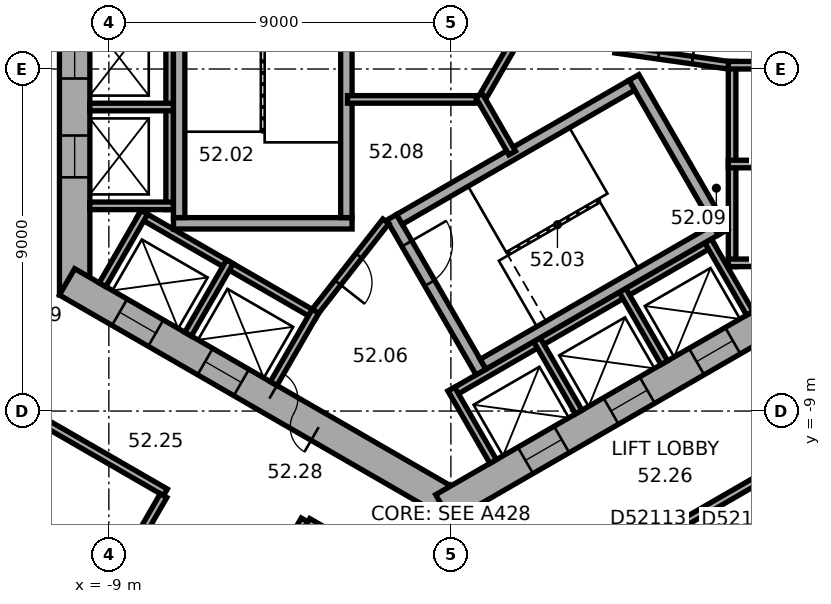
"""IFC4 building model, lengths in metres.
Left out: names, types, materials, properties, quantities, classifications, styles, units other than length and angle.
Written with IfcOpenShell. Run it as: python <this file> out.ifc"""

import sys

from ifc_helpers import new_model, si_unit, direction, frame, frame_2d, origin, place, context, subcontext, project, spatial, rectangle, extrude, element, fill, save


model = new_model("IFC4")
c1 = context("Model", 3, precision=1e-05, world=origin(), true_north=direction((0.0, 1.0)))
c2 = subcontext(c1, "Body", "Model", "MODEL_VIEW")
j1 = project(units=[si_unit("LENGTHUNIT", "METRE"), si_unit("PLANEANGLEUNIT", "RADIAN")], contexts=[c1])
p1 = place(None, origin())
s1 = spatial("IfcSite", under=j1, at=p1, CompositionType="ELEMENT")
p2 = place(p1, origin())
s2 = spatial("IfcBuilding", under=s1, at=p2, CompositionType="ELEMENT")
p3 = place(p2, frame((0.0, 0.0, 210.6)))
s3 = spatial("IfcBuildingStorey", under=s2, at=p3, CompositionType="ELEMENT", Elevation=210.6)
p4 = place(p3, frame((-9.9, 5.947, 0.0), z_axis=(0.0, 0.0, 1.0), x_axis=(0.0, -1.0, 0.0)))
e1 = element("IfcWall", 1, at=p4, inside=s3, PredefinedType="SHEAR", context=c2, shape_type="SweptSolid", body=[
    extrude(rectangle(XDim=11.894, YDim=0.8, at=frame_2d((5.947, 0.0))), origin(), (0.0, 0.0, 1.0), 3.7),
])
p5 = place(p4, frame((5.097, 0.0, 0.0)))
e2 = element("IfcOpeningElement", 2, at=p5, cuts=e1, PredefinedType="OPENING", context=c2, shape_type="SweptSolid", body=[
    extrude(rectangle(XDim=1.1, YDim=2.1, at=frame_2d((0.55, 1.05))), frame((0.0, 0.41, 0.0), z_axis=(0.0, -1.0, 0.0), x_axis=(1.0, 0.0, 0.0)), (0.0, 0.0, 1.0), 0.82),
])
p6 = place(p4, frame((7.697, 0.0, 0.0)))
e3 = element("IfcOpeningElement", 3, at=p6, cuts=e1, PredefinedType="OPENING", context=c2, shape_type="SweptSolid", body=[
    extrude(rectangle(XDim=1.1, YDim=2.1, at=frame_2d((0.55, 1.05))), frame((0.0, 0.41, 0.0), z_axis=(0.0, -1.0, 0.0), x_axis=(1.0, 0.0, 0.0)), (0.0, 0.0, 1.0), 0.82),
])
p7 = place(p3, frame((-10.1, -5.6, 0.0), z_axis=(0.0, 0.0, 1.0), x_axis=(0.866023897231, -0.500002609418, 0.0)))
e4 = element("IfcWall", 4, at=p7, inside=s3, PredefinedType="SHEAR", context=c2, shape_type="SweptSolid", body=[
    extrude(rectangle(XDim=11.894, YDim=0.8, at=frame_2d((5.947, 0.0))), origin(), (0.0, 0.0, 1.0), 3.7),
])
p8 = place(p7, frame((6.147, 0.0, 0.0)))
e5 = element("IfcOpeningElement", 5, at=p8, cuts=e4, PredefinedType="OPENING", context=c2, shape_type="SweptSolid", body=[
    extrude(rectangle(XDim=1.5, YDim=2.1, at=frame_2d((0.75, 1.05))), frame((0.0, 0.41, 0.0), z_axis=(0.0, -1.0, 0.0), x_axis=(1.0, 0.0, 0.0)), (0.0, 0.0, 1.0), 0.82),
])
p9 = place(p7, frame((1.597, 0.0, 0.0)))
e6 = element("IfcOpeningElement", 6, at=p9, cuts=e4, PredefinedType="OPENING", context=c2, shape_type="SweptSolid", body=[
    extrude(rectangle(XDim=1.1, YDim=2.1, at=frame_2d((0.55, 1.05))), frame((0.0, 0.41, 0.0), z_axis=(0.0, -1.0, 0.0), x_axis=(1.0, 0.0, 0.0)), (0.0, 0.0, 1.0), 0.82),
])
p10 = place(p7, frame((4.197, 0.0, 0.0)))
e7 = element("IfcOpeningElement", 7, at=p10, cuts=e4, PredefinedType="OPENING", context=c2, shape_type="SweptSolid", body=[
    extrude(rectangle(XDim=1.1, YDim=2.1, at=frame_2d((0.55, 1.05))), frame((0.0, 0.41, 0.0), z_axis=(0.0, -1.0, 0.0), x_axis=(1.0, 0.0, 0.0)), (0.0, 0.0, 1.0), 0.82),
])
p11 = place(p3, frame((-0.2, -11.547, 0.0), z_axis=(0.0, 0.0, 1.0), x_axis=(0.866023897231, 0.500002609418, 0.0)))
e8 = element("IfcWall", 8, at=p11, inside=s3, PredefinedType="SHEAR", context=c2, shape_type="SweptSolid", body=[
    extrude(rectangle(XDim=11.894, YDim=0.8, at=frame_2d((5.947, 0.0))), origin(), (0.0, 0.0, 1.0), 3.7),
])
p12 = place(p11, frame((2.497, 0.0, 0.0)))
e9 = element("IfcOpeningElement", 9, at=p12, cuts=e8, PredefinedType="OPENING", context=c2, shape_type="SweptSolid", body=[
    extrude(rectangle(XDim=1.1, YDim=2.1, at=frame_2d((0.55, 1.05))), frame((0.0, 0.41, 0.0), z_axis=(0.0, -1.0, 0.0), x_axis=(1.0, 0.0, 0.0)), (0.0, 0.0, 1.0), 0.82),
])
p13 = place(p11, frame((5.097, 0.0, 0.0)))
e10 = element("IfcOpeningElement", 10, at=p13, cuts=e8, PredefinedType="OPENING", context=c2, shape_type="SweptSolid", body=[
    extrude(rectangle(XDim=1.1, YDim=2.1, at=frame_2d((0.55, 1.05))), frame((0.0, 0.41, 0.0), z_axis=(0.0, -1.0, 0.0), x_axis=(1.0, 0.0, 0.0)), (0.0, 0.0, 1.0), 0.82),
])
p14 = place(p11, frame((7.697, 0.0, 0.0)))
e11 = element("IfcOpeningElement", 11, at=p14, cuts=e8, PredefinedType="OPENING", context=c2, shape_type="SweptSolid", body=[
    extrude(rectangle(XDim=1.1, YDim=2.1, at=frame_2d((0.55, 1.05))), frame((0.0, 0.41, 0.0), z_axis=(0.0, -1.0, 0.0), x_axis=(1.0, 0.0, 0.0)), (0.0, 0.0, 1.0), 0.82),
])
p15 = place(p3, frame((7.4, -5.2, 0.0), z_axis=(0.0, 0.0, 1.0), x_axis=(0.0, 1.0, 0.0)))
e12 = element("IfcWall", 12, at=p15, inside=s3, PredefinedType="PARTITIONING", context=c2, shape_type="SweptSolid", body=[
    extrude(rectangle(XDim=5.4, YDim=0.2, at=frame_2d((2.7, 0.0))), origin(), (0.0, 0.0, 1.0), 3.35),
])
for number, where, z_axis, x_axis in (
    (13, (7.3, -5.1, 0.0), (0.0, 0.0, 1.0), (1.0, 0.0, 0.0)),
    (14, (7.3, -2.5, 0.0), (0.0, 0.0, 1.0), (1.0, 0.0, 0.0)),
    (15, (7.3, 0.1, 0.0), (0.0, 0.0, 1.0), (1.0, 0.0, 0.0)),
):
    element("IfcWall", number, at=place(p3, frame(where, z_axis=z_axis, x_axis=x_axis)), inside=s3, PredefinedType="PARTITIONING", context=c2, shape_type="SweptSolid", body=[
        extrude(rectangle(XDim=2.2, YDim=0.2, at=frame_2d((1.1, 0.0))), origin(), (0.0, 0.0, 1.0), 3.35),
    ])
p16 = place(p3, frame((-7.4, 4.3, 0.0), z_axis=(0.0, 0.0, 1.0), x_axis=(0.0, -1.0, 0.0)))
e16 = element("IfcWall", 16, at=p16, inside=s3, PredefinedType="PARTITIONING", context=c2, shape_type="SweptSolid", body=[
    extrude(rectangle(XDim=8.0, YDim=0.2, at=frame_2d((4.0, 0.0))), origin(), (0.0, 0.0, 1.0), 3.35),
])
for number, where, z_axis, x_axis in (
    (17, (-7.3, -1.0, 0.0), (0.0, 0.0, 1.0), (-1.0, 0.0, 0.0)),
    (18, (-7.3, -3.6, 0.0), (0.0, 0.0, 1.0), (-1.0, 0.0, 0.0)),
):
    element("IfcWall", number, at=place(p3, frame(where, z_axis=z_axis, x_axis=x_axis)), inside=s3, PredefinedType="PARTITIONING", context=c2, shape_type="SweptSolid", body=[
        extrude(rectangle(XDim=2.2, YDim=0.2, at=frame_2d((1.1, 0.0))), origin(), (0.0, 0.0, 1.0), 3.35),
    ])
p17 = place(p3, frame((-8.203, -3.809, 0.0), z_axis=(0.0, 0.0, 1.0), x_axis=(0.866028230842, -0.499995103361, 0.0)))
e19 = element("IfcWall", 19, at=p17, inside=s3, PredefinedType="PARTITIONING", context=c2, shape_type="SweptSolid", body=[
    extrude(rectangle(XDim=5.4, YDim=0.2, at=frame_2d((2.7, 0.0))), origin(), (0.0, 0.0, 1.0), 3.35),
])
for number, where, z_axis, x_axis in (
    (20, (-8.067, -3.772, 0.0), (0.0, 0.0, 1.0), (-0.5, -0.866, 0.0)),
    (21, (-5.815, -5.072, 0.0), (0.0, 0.0, 1.0), (-0.5, -0.866, 0.0)),
):
    element("IfcWall", number, at=place(p3, frame(where, z_axis=z_axis, x_axis=x_axis)), inside=s3, PredefinedType="PARTITIONING", context=c2, shape_type="SweptSolid", body=[
        extrude(rectangle(XDim=2.2, YDim=0.2, at=frame_2d((1.1, 0.0))), origin(), (0.0, 0.0, 1.0), 3.35),
    ])
p18 = place(p3, frame((-3.563, -6.372, 0.0), z_axis=(0.0, 0.0, 1.0), x_axis=(-0.499994660107, -0.866028486751, 0.0)))
e22 = element("IfcWall", 22, at=p18, inside=s3, PredefinedType="PARTITIONING", context=c2, shape_type="SweptSolid", body=[
    extrude(rectangle(XDim=2.2, YDim=0.2, at=frame_2d((1.1, 0.0))), origin(), (0.0, 0.0, 1.0), 3.35),
])
p19 = place(p3, frame((-0.024, -8.559, 0.0), z_axis=(0.0, 0.0, 1.0), x_axis=(0.866026010844, 0.49999894854, 0.0)))
e23 = element("IfcWall", 23, at=p19, inside=s3, PredefinedType="PARTITIONING", context=c2, shape_type="SweptSolid", body=[
    extrude(rectangle(XDim=8.0, YDim=0.2, at=frame_2d((4.0, 0.0))), origin(), (0.0, 0.0, 1.0), 3.35),
])
for number, where, z_axis, x_axis in (
    (24, (0.013, -8.422, 0.0), (0.0, 0.0, 1.0), (0.5, -0.866, 0.0)),
    (25, (2.264, -7.122, 0.0), (0.0, 0.0, 1.0), (0.5, -0.866, 0.0)),
    (26, (4.516, -5.822, 0.0), (0.0, 0.0, 1.0), (0.5, -0.866, 0.0)),
    (27, (6.768, -4.522, 0.0), (0.0, 0.0, 1.0), (0.5, -0.866, 0.0)),
):
    element("IfcWall", number, at=place(p3, frame(where, z_axis=z_axis, x_axis=x_axis)), inside=s3, PredefinedType="PARTITIONING", context=c2, shape_type="SweptSolid", body=[
        extrude(rectangle(XDim=2.2, YDim=0.2, at=frame_2d((1.1, 0.0))), origin(), (0.0, 0.0, 1.0), 3.35),
    ])
p20 = place(p3, frame((-2.6, -4.06, 0.0), z_axis=(0.0, 0.0, 1.0), x_axis=(-1.0, 0.0, 0.0)))
e28 = element("IfcWall", 28, at=p20, inside=s3, PredefinedType="SHEAR", context=c2, shape_type="SweptSolid", body=[
    extrude(rectangle(XDim=4.7, YDim=0.3, at=frame_2d((2.35, 0.0))), origin(), (0.0, 0.0, 1.0), 3.35),
])
for number, where, z_axis, x_axis in (
    (29, (-2.75, 3.15, 0.0), (0.0, 0.0, 1.0), (0.0, -1.0, 0.0)),
    (30, (-7.15, 3.15, 0.0), (0.0, 0.0, 1.0), (0.0, -1.0, 0.0)),
):
    element("IfcWall", number, at=place(p3, frame(where, z_axis=z_axis, x_axis=x_axis)), inside=s3, PredefinedType="SHEAR", context=c2, shape_type="SweptSolid", body=[
        extrude(rectangle(XDim=7.06, YDim=0.3, at=frame_2d((3.53, 0.0))), origin(), (0.0, 0.0, 1.0), 3.35),
    ])
p21 = place(p3, frame((-1.558, -3.902, 0.0), z_axis=(0.0, 0.0, 1.0), x_axis=(0.499977259774, -0.866038532462, 0.0)))
e31 = element("IfcWall", 31, at=p21, inside=s3, PredefinedType="SHEAR", context=c2, shape_type="SweptSolid", body=[
    extrude(rectangle(XDim=4.7, YDim=0.3, at=frame_2d((2.35, 0.0))), origin(), (0.0, 0.0, 1.0), 3.35),
])
p22 = place(p21, frame((0.8, 0.0, 0.0)))
e32 = element("IfcOpeningElement", 32, at=p22, cuts=e31, PredefinedType="OPENING", context=c2, shape_type="SweptSolid", body=[
    extrude(rectangle(XDim=1.2, YDim=2.1, at=frame_2d((0.6, 1.05))), frame((0.0, 0.16, 0.0), z_axis=(0.0, -1.0, 0.0), x_axis=(1.0, 0.0, 0.0)), (0.0, 0.0, 1.0), 0.32),
])
p23 = place(p3, frame((4.816, -0.222, 0.0), z_axis=(0.0, 0.0, 1.0), x_axis=(0.499977259774, -0.866038532462, 0.0)))
e33 = element("IfcWall", 33, at=p23, inside=s3, PredefinedType="SHEAR", context=c2, shape_type="SweptSolid", body=[
    extrude(rectangle(XDim=4.7, YDim=0.3, at=frame_2d((2.35, 0.0))), origin(), (0.0, 0.0, 1.0), 3.35),
])
for number, where, z_axis, x_axis in (
    (34, (-1.353, -3.957, 0.0), (0.0, 0.0, 1.0), (0.866, 0.5, 0.0)),
    (35, (0.847, -7.767, 0.0), (0.0, 0.0, 1.0), (0.866, 0.5, 0.0)),
):
    element("IfcWall", number, at=place(p3, frame(where, z_axis=z_axis, x_axis=x_axis)), inside=s3, PredefinedType="SHEAR", context=c2, shape_type="SweptSolid", body=[
        extrude(rectangle(XDim=7.06, YDim=0.3, at=frame_2d((3.53, 0.0))), origin(), (0.0, 0.0, 1.0), 3.35),
    ])
p24 = place(p3, frame((4.327, 0.521, 0.0), z_axis=(0.0, 0.0, 1.0), x_axis=(0.990124376366, -0.14019172346, 0.0)))
e36 = element("IfcWall", 36, at=p24, inside=s3, PredefinedType="PARTITIONING", context=c2, shape_type="SweptSolid", body=[
    extrude(rectangle(XDim=3.002, YDim=0.2, at=frame_2d((1.501, 0.0))), origin(), (0.0, 0.0, 1.0), 3.35),
])
p25 = place(p24, frame((1.15, 0.0, 0.0)))
e37 = element("IfcOpeningElement", 37, at=p25, cuts=e36, PredefinedType="OPENING", context=c2, shape_type="SweptSolid", body=[
    extrude(rectangle(XDim=0.9, YDim=2.1, at=frame_2d((0.45, 1.05))), frame((0.0, 0.11, 0.0), z_axis=(0.0, -1.0, 0.0), x_axis=(1.0, 0.0, 0.0)), (0.0, 0.0, 1.0), 0.22),
])
p26 = place(p3, frame((-1.712, -4.008, 0.0), z_axis=(0.0, 0.0, 1.0), x_axis=(-0.616549420702, -0.787316208287, 0.0)))
e38 = element("IfcWall", 38, at=p26, inside=s3, PredefinedType="PARTITIONING", context=c2, shape_type="SweptSolid", body=[
    extrude(rectangle(XDim=3.002, YDim=0.2, at=frame_2d((1.501, 0.0))), origin(), (0.0, 0.0, 1.0), 3.35),
])
p27 = place(p26, frame((1.15, 0.0, 0.0)))
e39 = element("IfcOpeningElement", 39, at=p27, cuts=e38, PredefinedType="OPENING", context=c2, shape_type="SweptSolid", body=[
    extrude(rectangle(XDim=0.9, YDim=2.1, at=frame_2d((0.45, 1.05))), frame((0.0, 0.11, 0.0), z_axis=(0.0, -1.0, 0.0), x_axis=(1.0, 0.0, 0.0)), (0.0, 0.0, 1.0), 0.22),
])
p28 = place(p3, frame((0.92, -0.8, 0.0), z_axis=(0.0, 0.0, 1.0), x_axis=(-1.0, 0.0, 0.0)))
e40 = element("IfcWall", 40, at=p28, inside=s3, PredefinedType="PARTITIONING", context=c2, shape_type="SweptSolid", body=[
    extrude(rectangle(XDim=3.64, YDim=0.2, at=frame_2d((1.82, 0.0))), origin(), (0.0, 0.0, 1.0), 3.35),
])
p29 = place(p3, frame((0.74, -0.904, 0.0), z_axis=(0.0, 0.0, 1.0), x_axis=(0.500028278809, 0.866009076391, 0.0)))
e41 = element("IfcWall", 41, at=p29, inside=s3, PredefinedType="PARTITIONING", context=c2, shape_type="SweptSolid", body=[
    extrude(rectangle(XDim=3.133, YDim=0.2, at=frame_2d((1.566, 0.0))), origin(), (0.0, 0.0, 1.0), 3.35),
])
p30 = place(p3, frame((0.74, -0.696, 0.0), z_axis=(0.0, 0.0, 1.0), x_axis=(0.499956301907, -0.86605063142, 0.0)))
e42 = element("IfcWall", 42, at=p30, inside=s3, PredefinedType="PARTITIONING", context=c2, shape_type="SweptSolid", body=[
    extrude(rectangle(XDim=1.747, YDim=0.2, at=frame_2d((0.874, 0.0))), origin(), (0.0, 0.0, 1.0), 3.35),
])
p31 = place(p3, frame((-11.551, -8.805, 0.0), z_axis=(0.0, 0.0, 1.0), x_axis=(0.866038310922, -0.499977643516, 0.0)))
e43 = element("IfcWall", 43, at=p31, inside=s3, PredefinedType="PARTITIONING", context=c2, shape_type="SweptSolid", body=[
    extrude(rectangle(XDim=4.665, YDim=0.2, at=frame_2d((2.333, 0.0))), origin(), (0.0, 0.0, 1.0), 3.35),
])
p32 = place(p3, frame((-10.585, -16.463, 0.0), z_axis=(0.0, 0.0, 1.0), x_axis=(0.499993802756, 0.866028981735, 0.0)))
e44 = element("IfcWall", 44, at=p32, inside=s3, PredefinedType="PARTITIONING", context=c2, shape_type="SweptSolid", body=[
    extrude(rectangle(XDim=6.049, YDim=0.2, at=frame_2d((3.024, 0.0))), origin(), (0.0, 0.0, 1.0), 2.65),
])
p33 = place(p32, frame((2.524, 0.0, 0.0)))
e45 = element("IfcOpeningElement", 45, at=p33, cuts=e44, PredefinedType="OPENING", context=c2, shape_type="SweptSolid", body=[
    extrude(rectangle(XDim=1.0, YDim=2.1, at=frame_2d((0.5, 1.05))), frame((0.0, 0.11, 0.0), z_axis=(0.0, -1.0, 0.0), x_axis=(1.0, 0.0, 0.0)), (0.0, 0.0, 1.0), 0.22),
])
p34 = place(p3, frame((-7.525, -18.23, 0.0), z_axis=(0.0, 0.0, 1.0), x_axis=(0.499983153418, 0.866035129944, 0.0)))
e46 = element("IfcWall", 46, at=p34, inside=s3, PredefinedType="PARTITIONING", context=c2, shape_type="SweptSolid", body=[
    extrude(rectangle(XDim=7.35, YDim=0.2, at=frame_2d((3.675, 0.0))), origin(), (0.0, 0.0, 1.0), 3.35),
])
p35 = place(p34, frame((3.175, 0.0, 0.0)))
e47 = element("IfcOpeningElement", 47, at=p35, cuts=e46, PredefinedType="OPENING", context=c2, shape_type="SweptSolid", body=[
    extrude(rectangle(XDim=1.0, YDim=2.1, at=frame_2d((0.5, 1.05))), frame((0.0, 0.11, 0.0), z_axis=(0.0, -1.0, 0.0), x_axis=(1.0, 0.0, 0.0)), (0.0, 0.0, 1.0), 0.22),
])
p36 = place(p3, frame((-3.763, -11.915, 0.0), z_axis=(0.0, 0.0, 1.0), x_axis=(0.866037915695, -0.499978328108, 0.0)))
e48 = element("IfcWall", 48, at=p36, inside=s3, PredefinedType="PARTITIONING", context=c2, shape_type="SweptSolid", body=[
    extrude(rectangle(XDim=3.249, YDim=0.2, at=frame_2d((1.625, 0.0))), origin(), (0.0, 0.0, 1.0), 3.35),
])
p37 = place(p3, frame((2.716, -13.906, 0.0), z_axis=(0.0, 0.0, 1.0), x_axis=(0.866040290674, 0.499974214264, 0.0)))
e49 = element("IfcWall", 49, at=p37, inside=s3, PredefinedType="PARTITIONING", context=c2, shape_type="SweptSolid", body=[
    extrude(rectangle(XDim=8.702, YDim=0.2, at=frame_2d((4.351, 0.0))), origin(), (0.0, 0.0, 1.0), 3.35),
])
p38 = place(p37, frame((2.679, 0.0, 0.0)))
e50 = element("IfcOpeningElement", 50, at=p38, cuts=e49, PredefinedType="OPENING", context=c2, shape_type="SweptSolid", body=[
    extrude(rectangle(XDim=1.0, YDim=2.1, at=frame_2d((0.5, 1.05))), frame((0.0, 0.11, 0.0), z_axis=(0.0, -1.0, 0.0), x_axis=(1.0, 0.0, 0.0)), (0.0, 0.0, 1.0), 0.22),
])
p39 = place(p8, origin())
e51 = element("IfcDoor", 51, at=p39, inside=s3, OperationType="DOUBLE_DOOR_SINGLE_SWING", PredefinedType="DOOR", context=c2, shape_type="SweptSolid", body=[
    extrude(rectangle(XDim=1.5, YDim=2.1, at=frame_2d((0.75, 1.05))), frame((0.0, 0.025, 0.0), z_axis=(0.0, -1.0, 0.0), x_axis=(1.0, 0.0, 0.0)), (0.0, 0.0, 1.0), 0.05),
])
fill(e5, e51)
p40 = place(p22, origin())
e52 = element("IfcDoor", 52, at=p40, inside=s3, OperationType="SINGLE_SWING_RIGHT", PredefinedType="DOOR", context=c2, shape_type="SweptSolid", body=[
    extrude(rectangle(XDim=1.2, YDim=2.1, at=frame_2d((0.6, 1.05))), frame((0.0, 0.025, 0.0), z_axis=(0.0, -1.0, 0.0), x_axis=(1.0, 0.0, 0.0)), (0.0, 0.0, 1.0), 0.05),
])
fill(e32, e52)
p41 = place(p25, origin())
e53 = element("IfcDoor", 53, at=p41, inside=s3, OperationType="SINGLE_SWING_LEFT", PredefinedType="DOOR", context=c2, shape_type="SweptSolid", body=[
    extrude(rectangle(XDim=0.9, YDim=2.1, at=frame_2d((0.45, 1.05))), frame((0.0, 0.025, 0.0), z_axis=(0.0, -1.0, 0.0), x_axis=(1.0, 0.0, 0.0)), (0.0, 0.0, 1.0), 0.05),
])
fill(e37, e53)
p42 = place(p27, origin())
e54 = element("IfcDoor", 54, at=p42, inside=s3, OperationType="SINGLE_SWING_LEFT", PredefinedType="DOOR", context=c2, shape_type="SweptSolid", body=[
    extrude(rectangle(XDim=0.9, YDim=2.1, at=frame_2d((0.45, 1.05))), frame((0.0, 0.025, 0.0), z_axis=(0.0, -1.0, 0.0), x_axis=(1.0, 0.0, 0.0)), (0.0, 0.0, 1.0), 0.05),
])
fill(e39, e54)
p43 = place(p5, origin())
e55 = element("IfcDoor", 55, at=p43, inside=s3, OperationType="DOUBLE_DOOR_SLIDING", PredefinedType="DOOR", context=c2, shape_type="SweptSolid", body=[
    extrude(rectangle(XDim=1.1, YDim=2.1, at=frame_2d((0.55, 1.05))), frame((0.0, 0.025, 0.0), z_axis=(0.0, -1.0, 0.0), x_axis=(1.0, 0.0, 0.0)), (0.0, 0.0, 1.0), 0.05),
])
fill(e2, e55)
p44 = place(p6, origin())
e56 = element("IfcDoor", 56, at=p44, inside=s3, OperationType="DOUBLE_DOOR_SLIDING", PredefinedType="DOOR", context=c2, shape_type="SweptSolid", body=[
    extrude(rectangle(XDim=1.1, YDim=2.1, at=frame_2d((0.55, 1.05))), frame((0.0, 0.025, 0.0), z_axis=(0.0, -1.0, 0.0), x_axis=(1.0, 0.0, 0.0)), (0.0, 0.0, 1.0), 0.05),
])
fill(e3, e56)
p45 = place(p9, origin())
e57 = element("IfcDoor", 57, at=p45, inside=s3, OperationType="DOUBLE_DOOR_SLIDING", PredefinedType="DOOR", context=c2, shape_type="SweptSolid", body=[
    extrude(rectangle(XDim=1.1, YDim=2.1, at=frame_2d((0.55, 1.05))), frame((0.0, 0.025, 0.0), z_axis=(0.0, -1.0, 0.0), x_axis=(1.0, 0.0, 0.0)), (0.0, 0.0, 1.0), 0.05),
])
fill(e6, e57)
p46 = place(p10, origin())
e58 = element("IfcDoor", 58, at=p46, inside=s3, OperationType="DOUBLE_DOOR_SLIDING", PredefinedType="DOOR", context=c2, shape_type="SweptSolid", body=[
    extrude(rectangle(XDim=1.1, YDim=2.1, at=frame_2d((0.55, 1.05))), frame((0.0, 0.025, 0.0), z_axis=(0.0, -1.0, 0.0), x_axis=(1.0, 0.0, 0.0)), (0.0, 0.0, 1.0), 0.05),
])
fill(e7, e58)
p47 = place(p12, origin())
e59 = element("IfcDoor", 59, at=p47, inside=s3, OperationType="DOUBLE_DOOR_SLIDING", PredefinedType="DOOR", context=c2, shape_type="SweptSolid", body=[
    extrude(rectangle(XDim=1.1, YDim=2.1, at=frame_2d((0.55, 1.05))), frame((0.0, 0.025, 0.0), z_axis=(0.0, -1.0, 0.0), x_axis=(1.0, 0.0, 0.0)), (0.0, 0.0, 1.0), 0.05),
])
fill(e9, e59)
p48 = place(p13, origin())
e60 = element("IfcDoor", 60, at=p48, inside=s3, OperationType="DOUBLE_DOOR_SLIDING", PredefinedType="DOOR", context=c2, shape_type="SweptSolid", body=[
    extrude(rectangle(XDim=1.1, YDim=2.1, at=frame_2d((0.55, 1.05))), frame((0.0, 0.025, 0.0), z_axis=(0.0, -1.0, 0.0), x_axis=(1.0, 0.0, 0.0)), (0.0, 0.0, 1.0), 0.05),
])
fill(e10, e60)
p49 = place(p14, origin())
e61 = element("IfcDoor", 61, at=p49, inside=s3, OperationType="DOUBLE_DOOR_SLIDING", PredefinedType="DOOR", context=c2, shape_type="SweptSolid", body=[
    extrude(rectangle(XDim=1.1, YDim=2.1, at=frame_2d((0.55, 1.05))), frame((0.0, 0.025, 0.0), z_axis=(0.0, -1.0, 0.0), x_axis=(1.0, 0.0, 0.0)), (0.0, 0.0, 1.0), 0.05),
])
fill(e11, e61)
save(model, sys.argv[1])
